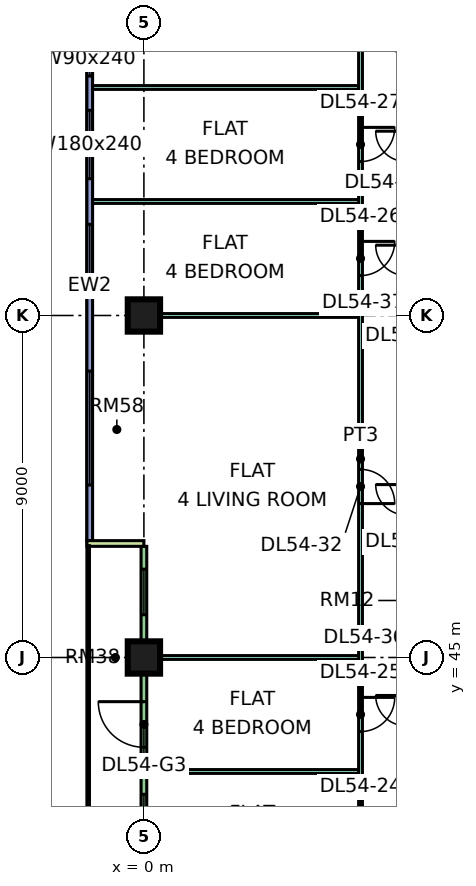
"""IFC4 building model, lengths in metres.
Left out: names, types, materials, properties, quantities, classifications, styles, units other than length and angle.
Written with IfcOpenShell. Run it as: python <this file> out.ifc"""

import sys

from ifc_helpers import new_model, si_unit, direction, frame, frame_2d, origin, origin_2d, place, context, subcontext, project, spatial, rectangle, extrude, element, fill, save


model = new_model("IFC4")
c1 = context("Model", 3, precision=1e-05, world=origin(), true_north=direction((0.0, 1.0)))
c2 = subcontext(c1, "Body", "Model", "MODEL_VIEW")
j1 = project(units=[si_unit("LENGTHUNIT", "METRE"), si_unit("PLANEANGLEUNIT", "RADIAN")], contexts=[c1])
p1 = place(None, origin())
s1 = spatial("IfcSite", under=j1, at=p1, CompositionType="ELEMENT")
p2 = place(p1, origin())
s2 = spatial("IfcBuilding", under=s1, at=p2, CompositionType="ELEMENT")
p3 = place(p2, frame((0.0, 0.0, 230.4)))
s3 = spatial("IfcBuildingStorey", under=s2, at=p3, CompositionType="ELEMENT", Elevation=230.4)
p4 = place(p3, frame((0.0, 45.0, 0.0), z_axis=(0.0, 0.0, 1.0), x_axis=(1.0, 0.0, 0.0)))
e1 = element("IfcColumn", 1, at=p4, inside=s3, PredefinedType="COLUMN", context=c2, shape_type="SweptSolid", body=[
    extrude(rectangle(XDim=0.85, YDim=0.85, at=origin_2d()), origin(), (0.0, 0.0, 1.0), 3.75),
])
p5 = place(p3, frame((0.0, 54.0, 0.0), z_axis=(0.0, 0.0, 1.0), x_axis=(1.0, 0.0, 0.0)))
e2 = element("IfcColumn", 2, at=p5, inside=s3, PredefinedType="COLUMN", context=c2, shape_type="SweptSolid", body=[
    extrude(rectangle(XDim=0.85, YDim=0.85, at=origin_2d()), origin(), (0.0, 0.0, 1.0), 3.75),
])
p6 = place(p3, frame((-1.425, 61.5, 0.0), z_axis=(0.0, 0.0, 1.0), x_axis=(0.0, -1.0, 0.0)))
e3 = element("IfcWall", 3, at=p6, inside=s3, PredefinedType="SOLIDWALL", context=c2, shape_type="SweptSolid", body=[
    extrude(rectangle(XDim=13.425, YDim=0.15, at=frame_2d((6.712, 0.0))), origin(), (0.0, 0.0, 1.0), 3.35),
])
p7 = place(p6, frame((0.3, 0.0, 0.45)))
e4 = element("IfcOpeningElement", 4, at=p7, cuts=e3, PredefinedType="OPENING", context=c2, shape_type="SweptSolid", body=[
    extrude(rectangle(XDim=0.9, YDim=2.4, at=frame_2d((0.45, 1.2))), frame((0.0, 0.085, 0.0), z_axis=(0.0, -1.0, 0.0), x_axis=(1.0, 0.0, 0.0)), (0.0, 0.0, 1.0), 0.17),
])
p8 = place(p6, frame((2.1, 0.0, 0.45)))
e5 = element("IfcOpeningElement", 5, at=p8, cuts=e3, PredefinedType="OPENING", context=c2, shape_type="SweptSolid", body=[
    extrude(rectangle(XDim=1.8, YDim=2.4, at=frame_2d((0.9, 1.2))), frame((0.0, 0.085, 0.0), z_axis=(0.0, -1.0, 0.0), x_axis=(1.0, 0.0, 0.0)), (0.0, 0.0, 1.0), 0.17),
])
p9 = place(p6, frame((5.1, 0.0, 0.45)))
e6 = element("IfcOpeningElement", 6, at=p9, cuts=e3, PredefinedType="OPENING", context=c2, shape_type="SweptSolid", body=[
    extrude(rectangle(XDim=1.8, YDim=2.4, at=frame_2d((0.9, 1.2))), frame((0.0, 0.085, 0.0), z_axis=(0.0, -1.0, 0.0), x_axis=(1.0, 0.0, 0.0)), (0.0, 0.0, 1.0), 0.17),
])
p10 = place(p6, frame((8.962, 0.0, 0.45)))
e7 = element("IfcOpeningElement", 7, at=p10, cuts=e3, PredefinedType="OPENING", context=c2, shape_type="SweptSolid", body=[
    extrude(rectangle(XDim=3.0, YDim=2.4, at=frame_2d((1.5, 1.2))), frame((0.0, 0.085, 0.0), z_axis=(0.0, -1.0, 0.0), x_axis=(1.0, 0.0, 0.0)), (0.0, 0.0, 1.0), 0.17),
])
p11 = place(p3, frame((0.0, 47.925, 0.0), z_axis=(0.0, 0.0, 1.0), x_axis=(0.0, -1.0, 0.0)))
e8 = element("IfcWall", 8, at=p11, inside=s3, PredefinedType="SOLIDWALL", context=c2, shape_type="SweptSolid", body=[
    extrude(rectangle(XDim=11.85, YDim=0.15, at=frame_2d((5.925, 0.0))), origin(), (0.0, 0.0, 1.0), 3.35),
])
p12 = place(p11, frame((0.6, 0.0, 0.45)))
e9 = element("IfcOpeningElement", 9, at=p12, cuts=e8, PredefinedType="OPENING", context=c2, shape_type="SweptSolid", body=[
    extrude(rectangle(XDim=1.2, YDim=2.4, at=frame_2d((0.6, 1.2))), frame((0.0, 0.085, 0.0), z_axis=(0.0, -1.0, 0.0), x_axis=(1.0, 0.0, 0.0)), (0.0, 0.0, 1.0), 0.17),
])
p13 = place(p11, frame((4.087, 0.0, 0.0)))
e10 = element("IfcOpeningElement", 10, at=p13, cuts=e8, PredefinedType="OPENING", context=c2, shape_type="SweptSolid", body=[
    extrude(rectangle(XDim=1.2, YDim=2.4, at=frame_2d((0.6, 1.2))), frame((0.0, 0.085, 0.0), z_axis=(0.0, -1.0, 0.0), x_axis=(1.0, 0.0, 0.0)), (0.0, 0.0, 1.0), 0.17),
])
p14 = place(p11, frame((6.525, 0.0, 0.45)))
e11 = element("IfcOpeningElement", 11, at=p14, cuts=e8, PredefinedType="OPENING", context=c2, shape_type="SweptSolid", body=[
    extrude(rectangle(XDim=1.8, YDim=2.4, at=frame_2d((0.9, 1.2))), frame((0.0, 0.085, 0.0), z_axis=(0.0, -1.0, 0.0), x_axis=(1.0, 0.0, 0.0)), (0.0, 0.0, 1.0), 0.17),
])
p15 = place(p11, frame((9.562, 0.0, 0.45)))
e12 = element("IfcOpeningElement", 12, at=p15, cuts=e8, PredefinedType="OPENING", context=c2, shape_type="SweptSolid", body=[
    extrude(rectangle(XDim=1.2, YDim=2.4, at=frame_2d((0.6, 1.2))), frame((0.0, 0.085, 0.0), z_axis=(0.0, -1.0, 0.0), x_axis=(1.0, 0.0, 0.0)), (0.0, 0.0, 1.0), 0.17),
])
p16 = place(p3, frame((-1.5, 48.0, 0.0), z_axis=(0.0, 0.0, 1.0), x_axis=(1.0, 0.0, 0.0)))
e13 = element("IfcWall", 13, at=p16, inside=s3, PredefinedType="SOLIDWALL", context=c2, shape_type="SweptSolid", body=[
    extrude(rectangle(XDim=1.5, YDim=0.15, at=frame_2d((0.75, 0.0))), origin(), (0.0, 0.0, 1.0), 3.35),
])
for number, where, z_axis, x_axis in (
    (14, (-1.351, 57.0, 0.0), (0.0, 0.0, 1.0), (1.0, 0.0, 0.0)),
    (15, (-1.351, 60.0, 0.0), (0.0, 0.0, 1.0), (1.0, 0.0, 0.0)),
):
    element("IfcWall", number, at=place(p3, frame(where, z_axis=z_axis, x_axis=x_axis)), inside=s3, PredefinedType="PARTITIONING", context=c2, shape_type="SweptSolid", body=[
        extrude(rectangle(XDim=7.001, YDim=0.1, at=frame_2d((3.5, 0.0))), origin(), (0.0, 0.0, 1.0), 3.35),
    ])
e16 = element("IfcWall", 16, at=p5, inside=s3, PredefinedType="PARTITIONING", context=c2, shape_type="SweptSolid", body=[
    extrude(rectangle(XDim=5.65, YDim=0.1, at=frame_2d((2.825, 0.0))), origin(), (0.0, 0.0, 1.0), 3.35),
])
for number, where, z_axis, x_axis in (
    (17, (0.074, 42.0, 0.0), (0.0, 0.0, 1.0), (1.0, 0.0, 0.0)),
    (18, (0.074, 45.0, 0.0), (0.0, 0.0, 1.0), (1.0, 0.0, 0.0)),
):
    element("IfcWall", number, at=place(p3, frame(where, z_axis=z_axis, x_axis=x_axis)), inside=s3, PredefinedType="PARTITIONING", context=c2, shape_type="SweptSolid", body=[
        extrude(rectangle(XDim=5.576, YDim=0.1, at=frame_2d((2.788, 0.0))), origin(), (0.0, 0.0, 1.0), 3.35),
    ])
p17 = place(p3, frame((5.7, 36.1, 0.0), z_axis=(0.0, 0.0, 1.0), x_axis=(0.0, 1.0, 0.0)))
e19 = element("IfcWall", 19, at=p17, inside=s3, PredefinedType="PARTITIONING", context=c2, shape_type="SweptSolid", body=[
    extrude(rectangle(XDim=28.25, YDim=0.1, at=frame_2d((14.125, 0.0))), origin(), (0.0, 0.0, 1.0), 3.35),
])
p18 = place(p17, frame((0.95, 0.0, 0.0)))
e20 = element("IfcOpeningElement", 20, at=p18, cuts=e19, PredefinedType="OPENING", context=c2, shape_type="SweptSolid", body=[
    extrude(rectangle(XDim=0.9, YDim=2.1, at=frame_2d((0.45, 1.05))), frame((0.0, 0.06, 0.0), z_axis=(0.0, -1.0, 0.0), x_axis=(1.0, 0.0, 0.0)), (0.0, 0.0, 1.0), 0.12),
])
p19 = place(p17, frame((3.95, 0.0, 0.0)))
e21 = element("IfcOpeningElement", 21, at=p19, cuts=e19, PredefinedType="OPENING", context=c2, shape_type="SweptSolid", body=[
    extrude(rectangle(XDim=0.9, YDim=2.1, at=frame_2d((0.45, 1.05))), frame((0.0, 0.06, 0.0), z_axis=(0.0, -1.0, 0.0), x_axis=(1.0, 0.0, 0.0)), (0.0, 0.0, 1.0), 0.12),
])
p20 = place(p17, frame((6.95, 0.0, 0.0)))
e22 = element("IfcOpeningElement", 22, at=p20, cuts=e19, PredefinedType="OPENING", context=c2, shape_type="SweptSolid", body=[
    extrude(rectangle(XDim=0.9, YDim=2.1, at=frame_2d((0.45, 1.05))), frame((0.0, 0.06, 0.0), z_axis=(0.0, -1.0, 0.0), x_axis=(1.0, 0.0, 0.0)), (0.0, 0.0, 1.0), 0.12),
])
p21 = place(p17, frame((18.95, 0.0, 0.0)))
e23 = element("IfcOpeningElement", 23, at=p21, cuts=e19, PredefinedType="OPENING", context=c2, shape_type="SweptSolid", body=[
    extrude(rectangle(XDim=0.9, YDim=2.1, at=frame_2d((0.45, 1.05))), frame((0.0, 0.06, 0.0), z_axis=(0.0, -1.0, 0.0), x_axis=(1.0, 0.0, 0.0)), (0.0, 0.0, 1.0), 0.12),
])
p22 = place(p17, frame((21.95, 0.0, 0.0)))
e24 = element("IfcOpeningElement", 24, at=p22, cuts=e19, PredefinedType="OPENING", context=c2, shape_type="SweptSolid", body=[
    extrude(rectangle(XDim=0.9, YDim=2.1, at=frame_2d((0.45, 1.05))), frame((0.0, 0.06, 0.0), z_axis=(0.0, -1.0, 0.0), x_axis=(1.0, 0.0, 0.0)), (0.0, 0.0, 1.0), 0.12),
])
p23 = place(p17, frame((24.95, 0.0, 0.0)))
e25 = element("IfcOpeningElement", 25, at=p23, cuts=e19, PredefinedType="OPENING", context=c2, shape_type="SweptSolid", body=[
    extrude(rectangle(XDim=0.9, YDim=2.1, at=frame_2d((0.45, 1.05))), frame((0.0, 0.06, 0.0), z_axis=(0.0, -1.0, 0.0), x_axis=(1.0, 0.0, 0.0)), (0.0, 0.0, 1.0), 0.12),
])
p24 = place(p17, frame((12.95, 0.0, 0.0)))
e26 = element("IfcOpeningElement", 26, at=p24, cuts=e19, PredefinedType="OPENING", context=c2, shape_type="SweptSolid", body=[
    extrude(rectangle(XDim=0.9, YDim=2.1, at=frame_2d((0.45, 1.05))), frame((0.0, 0.06, 0.0), z_axis=(0.0, -1.0, 0.0), x_axis=(1.0, 0.0, 0.0)), (0.0, 0.0, 1.0), 0.12),
])
p25 = place(p7, origin())
e27 = element("IfcWindow", 27, at=p25, inside=s3, PartitioningType="SINGLE_PANEL", PredefinedType="WINDOW", context=c2, shape_type="SweptSolid", body=[
    extrude(rectangle(XDim=0.9, YDim=2.4, at=frame_2d((0.45, 1.2))), frame((0.0, 0.03, 0.0), z_axis=(0.0, -1.0, 0.0), x_axis=(1.0, 0.0, 0.0)), (0.0, 0.0, 1.0), 0.06),
])
fill(e4, e27)
p26 = place(p8, origin())
e28 = element("IfcWindow", 28, at=p26, inside=s3, PartitioningType="SINGLE_PANEL", PredefinedType="WINDOW", context=c2, shape_type="SweptSolid", body=[
    extrude(rectangle(XDim=1.8, YDim=2.4, at=frame_2d((0.9, 1.2))), frame((0.0, 0.03, 0.0), z_axis=(0.0, -1.0, 0.0), x_axis=(1.0, 0.0, 0.0)), (0.0, 0.0, 1.0), 0.06),
])
fill(e5, e28)
p27 = place(p9, origin())
e29 = element("IfcWindow", 29, at=p27, inside=s3, PartitioningType="SINGLE_PANEL", PredefinedType="WINDOW", context=c2, shape_type="SweptSolid", body=[
    extrude(rectangle(XDim=1.8, YDim=2.4, at=frame_2d((0.9, 1.2))), frame((0.0, 0.03, 0.0), z_axis=(0.0, -1.0, 0.0), x_axis=(1.0, 0.0, 0.0)), (0.0, 0.0, 1.0), 0.06),
])
fill(e6, e29)
p28 = place(p10, origin())
e30 = element("IfcWindow", 30, at=p28, inside=s3, PartitioningType="SINGLE_PANEL", PredefinedType="WINDOW", context=c2, shape_type="SweptSolid", body=[
    extrude(rectangle(XDim=3.0, YDim=2.4, at=frame_2d((1.5, 1.2))), frame((0.0, 0.03, 0.0), z_axis=(0.0, -1.0, 0.0), x_axis=(1.0, 0.0, 0.0)), (0.0, 0.0, 1.0), 0.06),
])
fill(e7, e30)
p29 = place(p12, origin())
e31 = element("IfcWindow", 31, at=p29, inside=s3, PartitioningType="SINGLE_PANEL", PredefinedType="WINDOW", context=c2, shape_type="SweptSolid", body=[
    extrude(rectangle(XDim=1.2, YDim=2.4, at=frame_2d((0.6, 1.2))), frame((0.0, 0.03, 0.0), z_axis=(0.0, -1.0, 0.0), x_axis=(1.0, 0.0, 0.0)), (0.0, 0.0, 1.0), 0.06),
])
fill(e9, e31)
p30 = place(p13, frame((1.2, 0.0, 0.0), z_axis=(0.0, 0.0, 1.0), x_axis=(-1.0, 0.0, 0.0)))
e32 = element("IfcDoor", 32, at=p30, inside=s3, OperationType="DOUBLE_DOOR_SINGLE_SWING", PredefinedType="DOOR", context=c2, shape_type="SweptSolid", body=[
    extrude(rectangle(XDim=1.2, YDim=2.4, at=frame_2d((0.6, 1.2))), frame((0.0, 0.025, 0.0), z_axis=(0.0, -1.0, 0.0), x_axis=(1.0, 0.0, 0.0)), (0.0, 0.0, 1.0), 0.05),
])
fill(e10, e32)
p31 = place(p14, origin())
e33 = element("IfcWindow", 33, at=p31, inside=s3, PartitioningType="SINGLE_PANEL", PredefinedType="WINDOW", context=c2, shape_type="SweptSolid", body=[
    extrude(rectangle(XDim=1.8, YDim=2.4, at=frame_2d((0.9, 1.2))), frame((0.0, 0.03, 0.0), z_axis=(0.0, -1.0, 0.0), x_axis=(1.0, 0.0, 0.0)), (0.0, 0.0, 1.0), 0.06),
])
fill(e11, e33)
p32 = place(p20, origin())
e34 = element("IfcDoor", 34, at=p32, inside=s3, OperationType="SINGLE_SWING_RIGHT", PredefinedType="DOOR", context=c2, shape_type="SweptSolid", body=[
    extrude(rectangle(XDim=0.9, YDim=2.1, at=frame_2d((0.45, 1.05))), frame((0.0, 0.025, 0.0), z_axis=(0.0, -1.0, 0.0), x_axis=(1.0, 0.0, 0.0)), (0.0, 0.0, 1.0), 0.05),
])
fill(e22, e34)
p33 = place(p21, origin())
e35 = element("IfcDoor", 35, at=p33, inside=s3, OperationType="SINGLE_SWING_RIGHT", PredefinedType="DOOR", context=c2, shape_type="SweptSolid", body=[
    extrude(rectangle(XDim=0.9, YDim=2.1, at=frame_2d((0.45, 1.05))), frame((0.0, 0.025, 0.0), z_axis=(0.0, -1.0, 0.0), x_axis=(1.0, 0.0, 0.0)), (0.0, 0.0, 1.0), 0.05),
])
fill(e23, e35)
p34 = place(p22, origin())
e36 = element("IfcDoor", 36, at=p34, inside=s3, OperationType="SINGLE_SWING_RIGHT", PredefinedType="DOOR", context=c2, shape_type="SweptSolid", body=[
    extrude(rectangle(XDim=0.9, YDim=2.1, at=frame_2d((0.45, 1.05))), frame((0.0, 0.025, 0.0), z_axis=(0.0, -1.0, 0.0), x_axis=(1.0, 0.0, 0.0)), (0.0, 0.0, 1.0), 0.05),
])
fill(e24, e36)
p35 = place(p24, frame((0.9, 0.0, 0.0), z_axis=(0.0, 0.0, 1.0), x_axis=(-1.0, 0.0, 0.0)))
e37 = element("IfcDoor", 37, at=p35, inside=s3, OperationType="SINGLE_SWING_LEFT", PredefinedType="DOOR", context=c2, shape_type="SweptSolid", body=[
    extrude(rectangle(XDim=0.9, YDim=2.1, at=frame_2d((0.45, 1.05))), frame((0.0, 0.025, 0.0), z_axis=(0.0, -1.0, 0.0), x_axis=(1.0, 0.0, 0.0)), (0.0, 0.0, 1.0), 0.05),
])
fill(e26, e37)
save(model, sys.argv[1])
